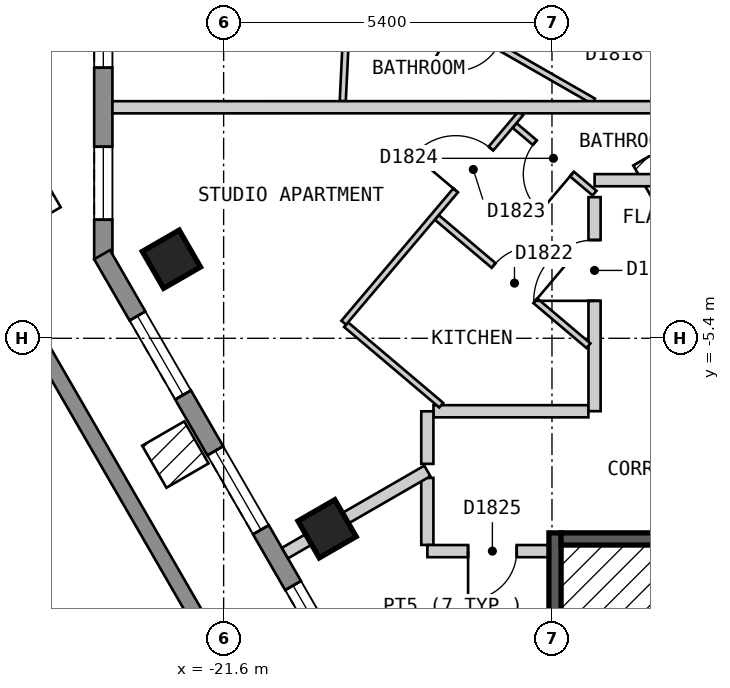
"""IFC4 building model, lengths in metres.
Left out: names, types, materials, properties, quantities, classifications, styles, units other than length and angle.
Written with IfcOpenShell. Run it as: python <this file> out.ifc"""

import sys

from ifc_helpers import new_model, si_unit, direction, frame, frame_2d, origin, origin_2d, place, context, subcontext, project, spatial, polyline, rectangle, outline, extrude, element, fill, save


model = new_model("IFC4")
c1 = context("Model", 3, precision=1e-05, world=origin(), true_north=direction((0.0, 1.0)))
c2 = subcontext(c1, "Body", "Model", "MODEL_VIEW")
j1 = project(units=[si_unit("LENGTHUNIT", "METRE"), si_unit("PLANEANGLEUNIT", "RADIAN")], contexts=[c1])
p1 = place(None, origin())
s1 = spatial("IfcSite", under=j1, at=p1, CompositionType="ELEMENT")
p2 = place(p1, origin())
s2 = spatial("IfcBuilding", under=s1, at=p2, CompositionType="ELEMENT")
p3 = place(p2, frame((0.0, 0.0, 202.8)))
s3 = spatial("IfcBuildingStorey", under=s2, at=p3, CompositionType="ELEMENT", Elevation=202.8)
for number, where, z_axis, x_axis in (
    (1, (-22.459, -4.1, 0.0), (0.0, 0.0, 1.0), (0.5, -0.866, 0.0)),
    (2, (-19.899, -8.533, 0.0), (0.0, 0.0, 1.0), (0.5, -0.866, 0.0)),
):
    element("IfcColumn", number, at=place(p3, frame(where, z_axis=z_axis, x_axis=x_axis)), inside=s3, PredefinedType="COLUMN", context=c2, shape_type="SweptSolid", body=[
        extrude(rectangle(XDim=0.7, YDim=0.7, at=origin_2d()), origin(), (0.0, 0.0, 1.0), 3.0),
    ])
p4 = place(p3, frame((-23.579, 0.9, 0.0), z_axis=(0.0, 0.0, 1.0), x_axis=(0.0, -1.0, 0.0)))
e3 = element("IfcWall", 3, at=p4, inside=s3, PredefinedType="SOLIDWALL", context=c2, shape_type="SweptSolid", body=[
    extrude(outline(polyline([(0.0, -0.15), (5.0, -0.15), (4.92, 0.15), (0.08, 0.15), (0.0, -0.15)])), origin(), (0.0, 0.0, 1.0), 2.7),
])
p5 = place(p4, frame((0.65, 0.0, 0.15)))
e4 = element("IfcOpeningElement", 4, at=p5, cuts=e3, PredefinedType="OPENING", context=c2, shape_type="SweptSolid", body=[
    extrude(rectangle(XDim=1.2, YDim=2.1, at=frame_2d((0.6, 1.05))), frame((0.0, 0.16, 0.0), z_axis=(0.0, -1.0, 0.0), x_axis=(1.0, 0.0, 0.0)), (0.0, 0.0, 1.0), 0.32),
])
p6 = place(p4, frame((3.15, 0.0, 0.15)))
e5 = element("IfcOpeningElement", 5, at=p6, cuts=e3, PredefinedType="OPENING", context=c2, shape_type="SweptSolid", body=[
    extrude(rectangle(XDim=1.2, YDim=2.1, at=frame_2d((0.6, 1.05))), frame((0.0, 0.16, 0.0), z_axis=(0.0, -1.0, 0.0), x_axis=(1.0, 0.0, 0.0)), (0.0, 0.0, 1.0), 0.32),
])
p7 = place(p3, frame((-23.599, -4.025, 0.0), z_axis=(0.0, 0.0, 1.0), x_axis=(0.500012653391, -0.866018098222, 0.0)))
e6 = element("IfcWall", 6, at=p7, inside=s3, PredefinedType="SOLIDWALL", context=c2, shape_type="SweptSolid", body=[
    extrude(outline(polyline([(0.0, -0.15), (16.628, -0.15), (16.548, 0.15), (0.08, 0.15), (0.0, -0.15)])), origin(), (0.0, 0.0, 1.0), 2.7),
])
p8 = place(p7, frame((1.164, 0.0, 0.15)))
e7 = element("IfcOpeningElement", 7, at=p8, cuts=e6, PredefinedType="OPENING", context=c2, shape_type="SweptSolid", body=[
    extrude(rectangle(XDim=1.5, YDim=2.1, at=frame_2d((0.75, 1.05))), frame((0.0, 0.16, 0.0), z_axis=(0.0, -1.0, 0.0), x_axis=(1.0, 0.0, 0.0)), (0.0, 0.0, 1.0), 0.32),
])
p9 = place(p7, frame((3.724, 0.0, 0.15)))
e8 = element("IfcOpeningElement", 8, at=p9, cuts=e6, PredefinedType="OPENING", context=c2, shape_type="SweptSolid", body=[
    extrude(rectangle(XDim=1.5, YDim=2.1, at=frame_2d((0.75, 1.05))), frame((0.0, 0.16, 0.0), z_axis=(0.0, -1.0, 0.0), x_axis=(1.0, 0.0, 0.0)), (0.0, 0.0, 1.0), 0.32),
])
p10 = place(p7, frame((6.283, 0.0, 0.15)))
e9 = element("IfcOpeningElement", 9, at=p10, cuts=e6, PredefinedType="OPENING", context=c2, shape_type="SweptSolid", body=[
    extrude(rectangle(XDim=1.5, YDim=2.1, at=frame_2d((0.75, 1.05))), frame((0.0, 0.16, 0.0), z_axis=(0.0, -1.0, 0.0), x_axis=(1.0, 0.0, 0.0)), (0.0, 0.0, 1.0), 0.32),
])
p11 = place(p7, frame((8.843, 0.0, 0.15)))
e10 = element("IfcOpeningElement", 10, at=p11, cuts=e6, PredefinedType="OPENING", context=c2, shape_type="SweptSolid", body=[
    extrude(rectangle(XDim=1.5, YDim=2.1, at=frame_2d((0.75, 1.05))), frame((0.0, 0.16, 0.0), z_axis=(0.0, -1.0, 0.0), x_axis=(1.0, 0.0, 0.0)), (0.0, 0.0, 1.0), 0.32),
])
p12 = place(p7, frame((11.403, 0.0, 0.15)))
e11 = element("IfcOpeningElement", 11, at=p12, cuts=e6, PredefinedType="OPENING", context=c2, shape_type="SweptSolid", body=[
    extrude(rectangle(XDim=1.5, YDim=2.1, at=frame_2d((0.75, 1.05))), frame((0.0, 0.16, 0.0), z_axis=(0.0, -1.0, 0.0), x_axis=(1.0, 0.0, 0.0)), (0.0, 0.0, 1.0), 0.32),
])
p13 = place(p7, frame((13.962, 0.0, 0.15)))
e12 = element("IfcOpeningElement", 12, at=p13, cuts=e6, PredefinedType="OPENING", context=c2, shape_type="SweptSolid", body=[
    extrude(rectangle(XDim=1.5, YDim=2.1, at=frame_2d((0.75, 1.05))), frame((0.0, 0.16, 0.0), z_axis=(0.0, -1.0, 0.0), x_axis=(1.0, 0.0, 0.0)), (0.0, 0.0, 1.0), 0.32),
])
p14 = place(p3, frame((-15.652, -21.037, 0.0), z_axis=(0.0, 0.0, 1.0), x_axis=(-0.500074253024, 0.865982529536, 0.0)))
e13 = element("IfcWall", 13, at=p14, inside=s3, PredefinedType="PARAPET", context=c2, shape_type="SweptSolid", body=[
    extrude(outline(polyline([(0.067, -0.125), (20.718, -0.125), (20.784, 0.125), (0.0, 0.125), (0.067, -0.125)])), origin(), (0.0, 0.0, 1.0), 1.6),
])
p15 = place(p3, frame((-18.25, -7.696, 0.0), z_axis=(0.0, 0.0, 1.0), x_axis=(0.0, -1.0, 0.0)))
e14 = element("IfcWall", 14, at=p15, inside=s3, PredefinedType="PARTITIONING", context=c2, shape_type="SweptSolid", body=[
    extrude(rectangle(XDim=1.103, YDim=0.2, at=frame_2d((0.552, 0.0))), origin(), (0.0, 0.0, 1.0), 2.7),
])
p16 = place(p3, frame((-18.149, -6.6, 0.0), z_axis=(0.0, 0.0, 1.0), x_axis=(1.0, 0.0, 0.0)))
e15 = element("IfcWall", 15, at=p16, inside=s3, PredefinedType="PARTITIONING", context=c2, shape_type="SweptSolid", body=[
    extrude(rectangle(XDim=2.548, YDim=0.2, at=frame_2d((1.274, 0.0))), origin(), (0.0, 0.0, 1.0), 2.7),
])
p17 = place(p3, frame((-18.249, -8.9, 0.0), z_axis=(0.0, 0.0, 1.0), x_axis=(1.0, 0.0, 0.0)))
e16 = element("IfcWall", 16, at=p17, inside=s3, PredefinedType="PARTITIONING", context=c2, shape_type="SweptSolid", body=[
    extrude(rectangle(XDim=2.199, YDim=0.2, at=frame_2d((1.1, 0.0))), origin(), (0.0, 0.0, 1.0), 2.7),
])
p18 = place(p17, frame((0.669, 0.0, 0.0)))
e17 = element("IfcOpeningElement", 17, at=p18, cuts=e16, PredefinedType="OPENING", context=c2, shape_type="SweptSolid", body=[
    extrude(rectangle(XDim=0.8, YDim=2.1, at=frame_2d((0.4, 1.05))), frame((0.0, 0.11, 0.0), z_axis=(0.0, -1.0, 0.0), x_axis=(1.0, 0.0, 0.0)), (0.0, 0.0, 1.0), 0.22),
])
p19 = place(p3, frame((-15.499, -2.8, 0.0), z_axis=(0.0, 0.0, 1.0), x_axis=(1.0, 0.0, 0.0)))
e18 = element("IfcWall", 18, at=p19, inside=s3, PredefinedType="PARTITIONING", context=c2, shape_type="SweptSolid", body=[
    extrude(rectangle(XDim=2.025, YDim=0.2, at=frame_2d((1.012, 0.0))), origin(), (0.0, 0.0, 1.0), 2.7),
])
p20 = place(p3, frame((-15.5, -6.599, 0.0), z_axis=(0.0, 0.0, 1.0), x_axis=(0.0, 1.0, 0.0)))
e19 = element("IfcWall", 19, at=p20, inside=s3, PredefinedType="PARTITIONING", context=c2, shape_type="SweptSolid", body=[
    extrude(rectangle(XDim=3.52, YDim=0.2, at=frame_2d((1.76, 0.0))), origin(), (0.0, 0.0, 1.0), 2.7),
])
p21 = place(p20, frame((1.815, 0.0, 0.0)))
e20 = element("IfcOpeningElement", 20, at=p21, cuts=e19, PredefinedType="OPENING", context=c2, shape_type="SweptSolid", body=[
    extrude(rectangle(XDim=1.0, YDim=2.1, at=frame_2d((0.5, 1.05))), frame((0.0, 0.11, 0.0), z_axis=(0.0, -1.0, 0.0), x_axis=(1.0, 0.0, 0.0)), (0.0, 0.0, 1.0), 0.22),
])
p22 = place(p3, frame((-18.25, -7.465, 0.0), z_axis=(0.0, 0.0, 1.0), x_axis=(0.0, 1.0, 0.0)))
e21 = element("IfcWall", 21, at=p22, inside=s3, PredefinedType="PARTITIONING", context=c2, shape_type="SweptSolid", body=[
    extrude(rectangle(XDim=0.864, YDim=0.2, at=frame_2d((0.432, 0.0))), origin(), (0.0, 0.0, 1.0), 2.7),
])
p23 = place(p3, frame((-17.441, 1.562, 0.0), z_axis=(0.0, 0.0, 1.0), x_axis=(0.867419073464, -0.497578286293, 0.0)))
e22 = element("IfcWall", 22, at=p23, inside=s3, PredefinedType="PARTITIONING", context=c2, shape_type="SweptSolid", body=[
    extrude(rectangle(XDim=5.185, YDim=0.1, at=frame_2d((2.593, 0.0))), origin(), (0.0, 0.0, 1.0), 2.7),
])
p24 = place(p23, frame((2.165, 0.0, 0.0)))
e23 = element("IfcOpeningElement", 23, at=p24, cuts=e22, PredefinedType="OPENING", context=c2, shape_type="SweptSolid", body=[
    extrude(rectangle(XDim=0.9, YDim=2.1, at=frame_2d((0.45, 1.05))), frame((0.0, 0.06, 0.0), z_axis=(0.0, -1.0, 0.0), x_axis=(1.0, 0.0, 0.0)), (0.0, 0.0, 1.0), 0.12),
])
p25 = place(p3, frame((-19.48, 0.771, 0.0), z_axis=(0.0, 0.0, 1.0), x_axis=(0.86748552317, -0.497462427817, 0.0)))
e24 = element("IfcWall", 24, at=p25, inside=s3, PredefinedType="PARTITIONING", context=c2, shape_type="SweptSolid", body=[
    extrude(rectangle(XDim=4.567, YDim=0.1, at=frame_2d((2.284, 0.0))), origin(), (0.0, 0.0, 1.0), 2.7),
])
p26 = place(p25, frame((1.956, 0.0, 0.0)))
e25 = element("IfcOpeningElement", 25, at=p26, cuts=e24, PredefinedType="OPENING", context=c2, shape_type="SweptSolid", body=[
    extrude(rectangle(XDim=0.8, YDim=2.1, at=frame_2d((0.4, 1.05))), frame((0.0, 0.06, 0.0), z_axis=(0.0, -1.0, 0.0), x_axis=(1.0, 0.0, 0.0)), (0.0, 0.0, 1.0), 0.12),
])
p27 = place(p3, frame((-16.816, -1.9, 0.0), z_axis=(0.0, 0.0, 1.0), x_axis=(0.763509851459, -0.645796180482, 0.0)))
e26 = element("IfcWall", 26, at=p27, inside=s3, PredefinedType="PARTITIONING", context=c2, shape_type="SweptSolid", body=[
    extrude(rectangle(XDim=1.724, YDim=0.1, at=frame_2d((0.862, 0.0))), origin(), (0.0, 0.0, 1.0), 2.7),
])
p28 = place(p27, frame((0.437, 0.0, 0.0)))
e27 = element("IfcOpeningElement", 27, at=p28, cuts=e26, PredefinedType="OPENING", context=c2, shape_type="SweptSolid", body=[
    extrude(rectangle(XDim=0.8, YDim=2.1, at=frame_2d((0.4, 1.05))), frame((0.0, 0.06, 0.0), z_axis=(0.0, -1.0, 0.0), x_axis=(1.0, 0.0, 0.0)), (0.0, 0.0, 1.0), 0.12),
])
p29 = place(p3, frame((-18.095, -3.412, 0.0), z_axis=(0.0, 0.0, 1.0), x_axis=(0.763564811502, -0.645731196889, 0.0)))
e28 = element("IfcWall", 28, at=p29, inside=s3, PredefinedType="PARTITIONING", context=c2, shape_type="SweptSolid", body=[
    extrude(rectangle(XDim=3.267, YDim=0.1, at=frame_2d((1.634, 0.0))), origin(), (0.0, 0.0, 1.0), 2.7),
])
p30 = place(p29, frame((1.224, 0.0, 0.0)))
e29 = element("IfcOpeningElement", 29, at=p30, cuts=e28, PredefinedType="OPENING", context=c2, shape_type="SweptSolid", body=[
    extrude(rectangle(XDim=0.9, YDim=2.1, at=frame_2d((0.45, 1.05))), frame((0.0, 0.06, 0.0), z_axis=(0.0, -1.0, 0.0), x_axis=(1.0, 0.0, 0.0)), (0.0, 0.0, 1.0), 0.12),
])
p31 = place(p3, frame((-19.586, -5.176, 0.0), z_axis=(0.0, 0.0, 1.0), x_axis=(0.763435976882, -0.645883510551, 0.0)))
e30 = element("IfcWall", 30, at=p31, inside=s3, PredefinedType="PARTITIONING", context=c2, shape_type="SweptSolid", body=[
    extrude(rectangle(XDim=2.05, YDim=0.1, at=frame_2d((1.025, 0.0))), origin(), (0.0, 0.0, 1.0), 2.7),
])
p32 = place(p3, frame((-19.625, -5.144, 0.0), z_axis=(0.0, 0.0, 1.0), x_axis=(0.645668001073, 0.763618250431, 0.0)))
e31 = element("IfcWall", 31, at=p32, inside=s3, PredefinedType="PARTITIONING", context=c2, shape_type="SweptSolid", body=[
    extrude(rectangle(XDim=4.51, YDim=0.1, at=frame_2d((2.255, 0.0))), origin(), (0.0, 0.0, 1.0), 2.7),
])
p33 = place(p32, frame((2.85, 0.0, 0.0)))
e32 = element("IfcOpeningElement", 32, at=p33, cuts=e31, PredefinedType="OPENING", context=c2, shape_type="SweptSolid", body=[
    extrude(rectangle(XDim=0.9, YDim=2.1, at=frame_2d((0.45, 1.05))), frame((0.0, 0.06, 0.0), z_axis=(0.0, -1.0, 0.0), x_axis=(1.0, 0.0, 0.0)), (0.0, 0.0, 1.0), 0.12),
])
p34 = place(p3, frame((-19.641, -1.5, 0.0), z_axis=(0.0, 0.0, 1.0), x_axis=(0.048898906005, 0.998803732968, 0.0)))
e33 = element("IfcWall", 33, at=p34, inside=s3, PredefinedType="PARTITIONING", context=c2, shape_type="SweptSolid", body=[
    extrude(rectangle(XDim=2.661, YDim=0.1, at=frame_2d((1.331, 0.0))), origin(), (0.0, 0.0, 1.0), 2.7),
])
p35 = place(p3, frame((-23.429, -1.601, 0.0), z_axis=(0.0, 0.0, 1.0), x_axis=(0.999999995449, 9.5406191e-05, 0.0)))
e34 = element("IfcWall", 34, at=p35, inside=s3, PredefinedType="PARTITIONING", context=c2, shape_type="SweptSolid", body=[
    extrude(rectangle(XDim=10.236, YDim=0.2, at=frame_2d((5.118, 0.0))), origin(), (0.0, 0.0, 1.0), 2.7),
])
p36 = place(p3, frame((-20.592, -8.933, 0.0), z_axis=(0.0, 0.0, 1.0), x_axis=(0.866045775131, 0.499964714133, 0.0)))
e35 = element("IfcWall", 35, at=p36, inside=s3, PredefinedType="PARTITIONING", context=c2, shape_type="SweptSolid", body=[
    extrude(rectangle(XDim=2.704, YDim=0.2, at=frame_2d((1.352, 0.0))), origin(), (0.0, 0.0, 1.0), 2.7),
])
p37 = place(p3, frame((-16.15, -14.4, 0.0), z_axis=(0.0, 0.0, 1.0), x_axis=(0.0, 1.0, 0.0)))
e36 = element("IfcWall", 36, at=p37, inside=s3, PredefinedType="SOLIDWALL", context=c2, shape_type="SweptSolid", body=[
    extrude(rectangle(XDim=5.8, YDim=0.2, at=frame_2d((2.9, 0.0))), origin(), (0.0, 0.0, 1.0), 2.7),
])
p38 = place(p3, frame((-16.05, -8.7, 0.0), z_axis=(0.0, 0.0, 1.0), x_axis=(1.0, 0.0, 0.0)))
e37 = element("IfcWall", 37, at=p38, inside=s3, PredefinedType="SOLIDWALL", context=c2, shape_type="SweptSolid", body=[
    extrude(rectangle(XDim=2.75, YDim=0.2, at=frame_2d((1.375, 0.0))), origin(), (0.0, 0.0, 1.0), 2.7),
])
p39 = place(p5, origin())
e38 = element("IfcWindow", 38, at=p39, inside=s3, PartitioningType="SINGLE_PANEL", PredefinedType="WINDOW", context=c2, shape_type="SweptSolid", body=[
    extrude(rectangle(XDim=1.2, YDim=2.1, at=frame_2d((0.6, 1.05))), frame((0.0, 0.03, 0.0), z_axis=(0.0, -1.0, 0.0), x_axis=(1.0, 0.0, 0.0)), (0.0, 0.0, 1.0), 0.06),
])
fill(e4, e38)
p40 = place(p6, origin())
e39 = element("IfcWindow", 39, at=p40, inside=s3, PartitioningType="SINGLE_PANEL", PredefinedType="WINDOW", context=c2, shape_type="SweptSolid", body=[
    extrude(rectangle(XDim=1.2, YDim=2.1, at=frame_2d((0.6, 1.05))), frame((0.0, 0.03, 0.0), z_axis=(0.0, -1.0, 0.0), x_axis=(1.0, 0.0, 0.0)), (0.0, 0.0, 1.0), 0.06),
])
fill(e5, e39)
p41 = place(p8, origin())
e40 = element("IfcWindow", 40, at=p41, inside=s3, PartitioningType="SINGLE_PANEL", PredefinedType="WINDOW", context=c2, shape_type="SweptSolid", body=[
    extrude(rectangle(XDim=1.5, YDim=2.1, at=frame_2d((0.75, 1.05))), frame((0.0, 0.03, 0.0), z_axis=(0.0, -1.0, 0.0), x_axis=(1.0, 0.0, 0.0)), (0.0, 0.0, 1.0), 0.06),
])
fill(e7, e40)
p42 = place(p9, origin())
e41 = element("IfcWindow", 41, at=p42, inside=s3, PartitioningType="SINGLE_PANEL", PredefinedType="WINDOW", context=c2, shape_type="SweptSolid", body=[
    extrude(rectangle(XDim=1.5, YDim=2.1, at=frame_2d((0.75, 1.05))), frame((0.0, 0.03, 0.0), z_axis=(0.0, -1.0, 0.0), x_axis=(1.0, 0.0, 0.0)), (0.0, 0.0, 1.0), 0.06),
])
fill(e8, e41)
p43 = place(p10, origin())
e42 = element("IfcWindow", 42, at=p43, inside=s3, PartitioningType="SINGLE_PANEL", PredefinedType="WINDOW", context=c2, shape_type="SweptSolid", body=[
    extrude(rectangle(XDim=1.5, YDim=2.1, at=frame_2d((0.75, 1.05))), frame((0.0, 0.03, 0.0), z_axis=(0.0, -1.0, 0.0), x_axis=(1.0, 0.0, 0.0)), (0.0, 0.0, 1.0), 0.06),
])
fill(e9, e42)
p44 = place(p21, origin())
e43 = element("IfcDoor", 43, at=p44, inside=s3, OperationType="SINGLE_SWING_LEFT", PredefinedType="DOOR", context=c2, shape_type="SweptSolid", body=[
    extrude(rectangle(XDim=1.0, YDim=2.1, at=frame_2d((0.5, 1.05))), frame((0.0, 0.025, 0.0), z_axis=(0.0, -1.0, 0.0), x_axis=(1.0, 0.0, 0.0)), (0.0, 0.0, 1.0), 0.05),
])
fill(e20, e43)
p45 = place(p30, origin())
e44 = element("IfcDoor", 44, at=p45, inside=s3, OperationType="SINGLE_SWING_RIGHT", PredefinedType="DOOR", context=c2, shape_type="SweptSolid", body=[
    extrude(rectangle(XDim=0.9, YDim=2.1, at=frame_2d((0.45, 1.05))), frame((0.0, 0.025, 0.0), z_axis=(0.0, -1.0, 0.0), x_axis=(1.0, 0.0, 0.0)), (0.0, 0.0, 1.0), 0.05),
])
fill(e29, e44)
p46 = place(p33, origin())
e45 = element("IfcDoor", 45, at=p46, inside=s3, OperationType="SINGLE_SWING_LEFT", PredefinedType="DOOR", context=c2, shape_type="SweptSolid", body=[
    extrude(rectangle(XDim=0.9, YDim=2.1, at=frame_2d((0.45, 1.05))), frame((0.0, 0.025, 0.0), z_axis=(0.0, -1.0, 0.0), x_axis=(1.0, 0.0, 0.0)), (0.0, 0.0, 1.0), 0.05),
])
fill(e32, e45)
p47 = place(p28, origin())
e46 = element("IfcDoor", 46, at=p47, inside=s3, OperationType="SINGLE_SWING_RIGHT", PredefinedType="DOOR", context=c2, shape_type="SweptSolid", body=[
    extrude(rectangle(XDim=0.8, YDim=2.1, at=frame_2d((0.4, 1.05))), frame((0.0, 0.025, 0.0), z_axis=(0.0, -1.0, 0.0), x_axis=(1.0, 0.0, 0.0)), (0.0, 0.0, 1.0), 0.05),
])
fill(e27, e46)
p48 = place(p18, origin())
e47 = element("IfcDoor", 47, at=p48, inside=s3, OperationType="SINGLE_SWING_LEFT", PredefinedType="DOOR", context=c2, shape_type="SweptSolid", body=[
    extrude(rectangle(XDim=0.8, YDim=2.1, at=frame_2d((0.4, 1.05))), frame((0.0, 0.025, 0.0), z_axis=(0.0, -1.0, 0.0), x_axis=(1.0, 0.0, 0.0)), (0.0, 0.0, 1.0), 0.05),
])
fill(e17, e47)
save(model, sys.argv[1])
